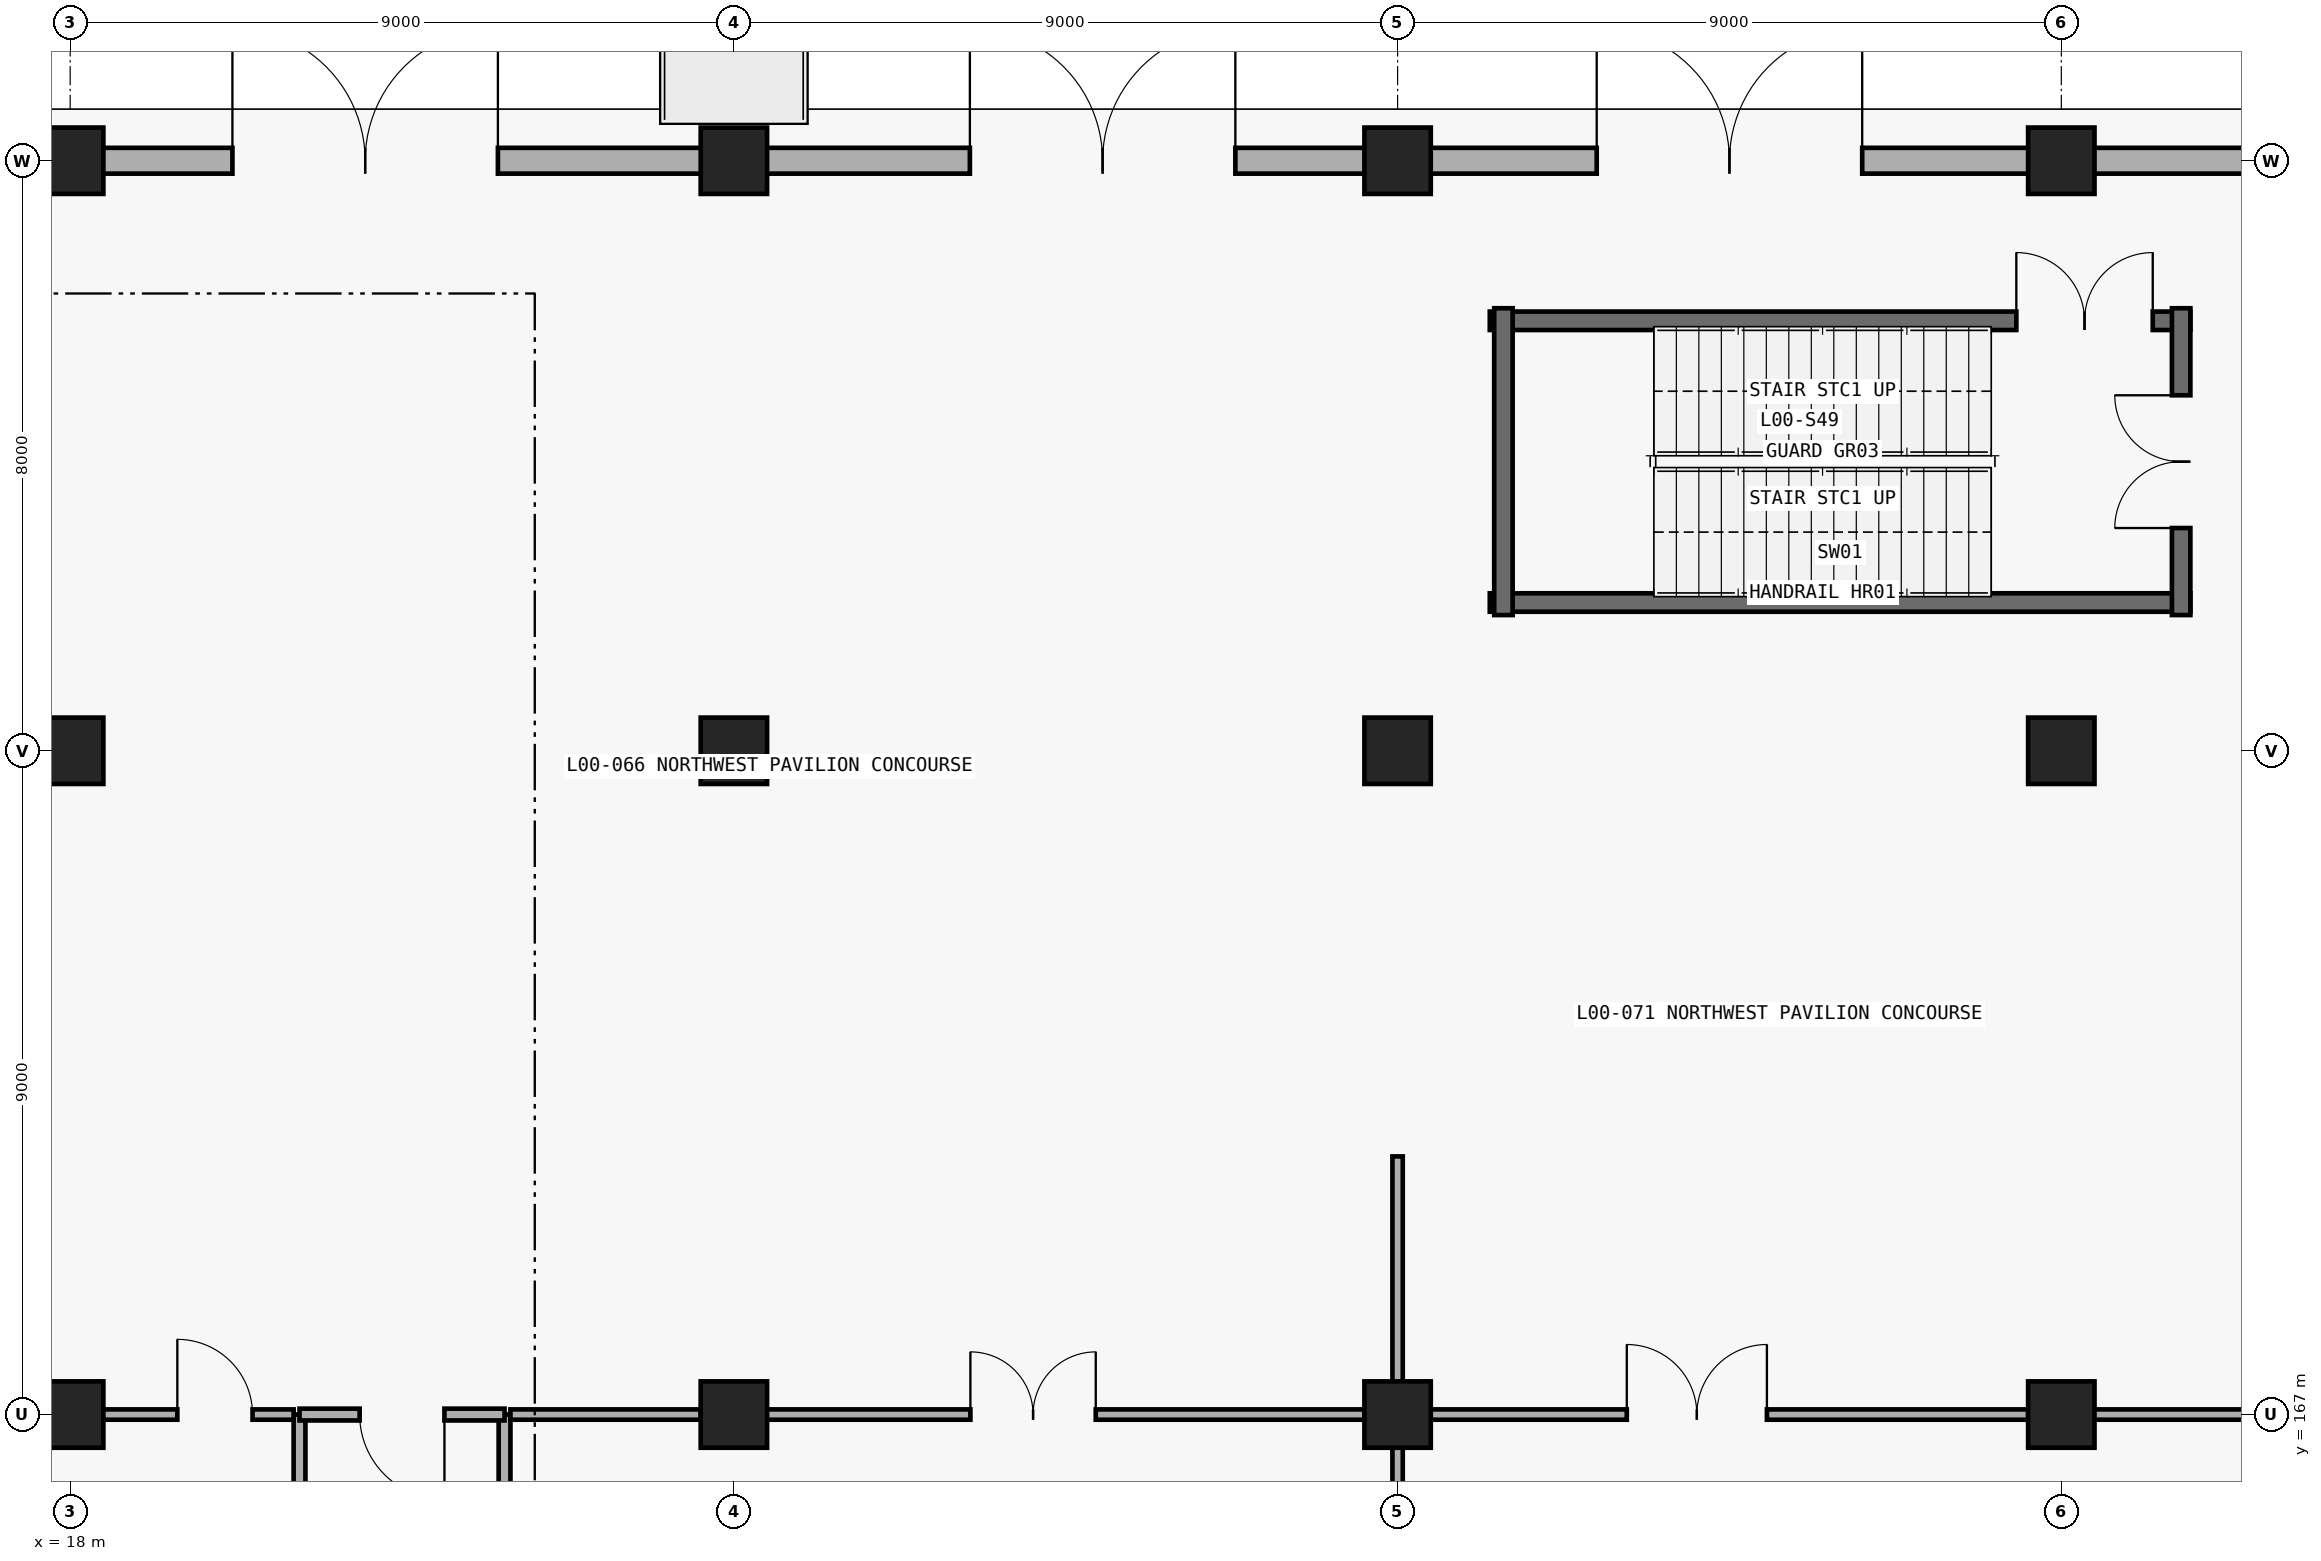
"""IFC4 building model, lengths in metres.
Left out: names, types, materials, properties, quantities, classifications, styles, units other than length and angle.
Written with IfcOpenShell. Run it as: python <this file> out.ifc"""

import sys

from ifc_helpers import new_model, si_unit, direction, frame, frame_2d, origin, origin_2d, place, context, subcontext, project, spatial, rectangle, extrude, element, fill, save


model = new_model("IFC4")
c1 = context("Model", 3, precision=1e-05, world=origin(), true_north=direction((0.0, 1.0)))
c2 = subcontext(c1, "Body", "Model", "MODEL_VIEW")
j1 = project(units=[si_unit("LENGTHUNIT", "METRE"), si_unit("PLANEANGLEUNIT", "RADIAN")], contexts=[c1])
p1 = place(None, origin())
s1 = spatial("IfcSite", under=j1, at=p1, CompositionType="ELEMENT")
p2 = place(p1, origin())
s2 = spatial("IfcBuilding", under=s1, at=p2, CompositionType="ELEMENT")
p3 = place(p2, origin())
s3 = spatial("IfcBuildingStorey", under=s2, at=p3, CompositionType="ELEMENT", Elevation=0.0)
for number, where, z_axis, x_axis in (
    (1, (18.0, 167.0, 0.0), (0.0, 0.0, 1.0), (1.0, 0.0, 0.0)),
    (2, (18.0, 176.0, 0.0), (0.0, 0.0, 1.0), (1.0, 0.0, 0.0)),
    (3, (18.0, 184.0, 0.0), (0.0, 0.0, 1.0), (1.0, 0.0, 0.0)),
    (4, (27.0, 167.0, 0.0), (0.0, 0.0, 1.0), (1.0, 0.0, 0.0)),
    (5, (27.0, 176.0, 0.0), (0.0, 0.0, 1.0), (1.0, 0.0, 0.0)),
    (6, (27.0, 184.0, 0.0), (0.0, 0.0, 1.0), (1.0, 0.0, 0.0)),
    (7, (36.0, 167.0, 0.0), (0.0, 0.0, 1.0), (1.0, 0.0, 0.0)),
    (8, (36.0, 176.0, 0.0), (0.0, 0.0, 1.0), (1.0, 0.0, 0.0)),
    (9, (36.0, 184.0, 0.0), (0.0, 0.0, 1.0), (1.0, 0.0, 0.0)),
    (10, (45.0, 167.0, 0.0), (0.0, 0.0, 1.0), (1.0, 0.0, 0.0)),
    (11, (45.0, 176.0, 0.0), (0.0, 0.0, 1.0), (1.0, 0.0, 0.0)),
    (12, (45.0, 184.0, 0.0), (0.0, 0.0, 1.0), (1.0, 0.0, 0.0)),
):
    element("IfcColumn", number, at=place(p3, frame(where, z_axis=z_axis, x_axis=x_axis)), inside=s3, PredefinedType="COLUMN", context=c2, shape_type="SweptSolid", body=[
        extrude(rectangle(XDim=0.9, YDim=0.9, at=origin_2d()), origin(), (0.0, 0.0, 1.0), 5.4),
    ])
p4 = place(p3, frame((18.425, 184.0, 0.0), z_axis=(0.0, 0.0, 1.0), x_axis=(1.0, 0.0, 0.0)))
e13 = element("IfcWall", 13, at=p4, inside=s3, PredefinedType="STANDARD", context=c2, shape_type="SweptSolid", body=[
    extrude(rectangle(XDim=8.15, YDim=0.35, at=frame_2d((4.075, 0.0))), origin(), (0.0, 0.0, 1.0), 4.384),
])
p5 = place(p4, frame((1.775, 0.0, 0.0)))
e14 = element("IfcOpeningElement", 14, at=p5, cuts=e13, PredefinedType="OPENING", context=c2, shape_type="SweptSolid", body=[
    extrude(rectangle(XDim=3.6, YDim=2.7, at=frame_2d((1.8, 1.35))), frame((0.0, 0.185, 0.0), z_axis=(0.0, -1.0, 0.0), x_axis=(1.0, 0.0, 0.0)), (0.0, 0.0, 1.0), 0.37),
])
p6 = place(p3, frame((27.425, 184.0, 0.0), z_axis=(0.0, 0.0, 1.0), x_axis=(1.0, 0.0, 0.0)))
e15 = element("IfcWall", 15, at=p6, inside=s3, PredefinedType="STANDARD", context=c2, shape_type="SweptSolid", body=[
    extrude(rectangle(XDim=8.15, YDim=0.35, at=frame_2d((4.075, 0.0))), origin(), (0.0, 0.0, 1.0), 4.384),
])
p7 = place(p6, frame((2.775, 0.0, 0.0)))
e16 = element("IfcOpeningElement", 16, at=p7, cuts=e15, PredefinedType="OPENING", context=c2, shape_type="SweptSolid", body=[
    extrude(rectangle(XDim=3.6, YDim=2.7, at=frame_2d((1.8, 1.35))), frame((0.0, 0.185, 0.0), z_axis=(0.0, -1.0, 0.0), x_axis=(1.0, 0.0, 0.0)), (0.0, 0.0, 1.0), 0.37),
])
p8 = place(p3, frame((36.425, 184.0, 0.0), z_axis=(0.0, 0.0, 1.0), x_axis=(1.0, 0.0, 0.0)))
e17 = element("IfcWall", 17, at=p8, inside=s3, PredefinedType="STANDARD", context=c2, shape_type="SweptSolid", body=[
    extrude(rectangle(XDim=8.15, YDim=0.35, at=frame_2d((4.075, 0.0))), origin(), (0.0, 0.0, 1.0), 4.384),
])
p9 = place(p8, frame((2.275, 0.0, 0.0)))
e18 = element("IfcOpeningElement", 18, at=p9, cuts=e17, PredefinedType="OPENING", context=c2, shape_type="SweptSolid", body=[
    extrude(rectangle(XDim=3.6, YDim=2.7, at=frame_2d((1.8, 1.35))), frame((0.0, 0.185, 0.0), z_axis=(0.0, -1.0, 0.0), x_axis=(1.0, 0.0, 0.0)), (0.0, 0.0, 1.0), 0.37),
])
p10 = place(p3, frame((45.425, 184.0, 0.0), z_axis=(0.0, 0.0, 1.0), x_axis=(1.0, 0.0, 0.0)))
e19 = element("IfcWall", 19, at=p10, inside=s3, PredefinedType="STANDARD", context=c2, shape_type="SweptSolid", body=[
    extrude(rectangle(XDim=8.15, YDim=0.35, at=frame_2d((4.075, 0.0))), origin(), (0.0, 0.0, 1.0), 4.384),
])
p11 = place(p10, frame((2.275, 0.0, 0.0)))
e20 = element("IfcOpeningElement", 20, at=p11, cuts=e19, PredefinedType="OPENING", context=c2, shape_type="SweptSolid", body=[
    extrude(rectangle(XDim=3.6, YDim=2.7, at=frame_2d((1.8, 1.35))), frame((0.0, 0.185, 0.0), z_axis=(0.0, -1.0, 0.0), x_axis=(1.0, 0.0, 0.0)), (0.0, 0.0, 1.0), 0.37),
])
p12 = place(p3, frame((37.25, 181.83, 0.0), z_axis=(0.0, 0.0, 1.0), x_axis=(1.0, 0.0, 0.0)))
e21 = element("IfcWall", 21, at=p12, inside=s3, PredefinedType="SHEAR", context=c2, shape_type="SweptSolid", body=[
    extrude(rectangle(XDim=9.5, YDim=0.25, at=frame_2d((4.75, 0.0))), origin(), (0.0, 0.0, 1.0), 5.1),
])
p13 = place(p12, frame((7.14, 0.0, 0.0)))
e22 = element("IfcOpeningElement", 22, at=p13, cuts=e21, PredefinedType="OPENING", context=c2, shape_type="SweptSolid", body=[
    extrude(rectangle(XDim=1.85, YDim=2.3, at=frame_2d((0.925, 1.15))), frame((0.0, 0.135, 0.0), z_axis=(0.0, -1.0, 0.0), x_axis=(1.0, 0.0, 0.0)), (0.0, 0.0, 1.0), 0.27),
])
p14 = place(p3, frame((37.25, 178.01, 0.0), z_axis=(0.0, 0.0, 1.0), x_axis=(1.0, 0.0, 0.0)))
e23 = element("IfcWall", 23, at=p14, inside=s3, PredefinedType="SHEAR", context=c2, shape_type="SweptSolid", body=[
    extrude(rectangle(XDim=9.5, YDim=0.25, at=frame_2d((4.75, 0.0))), origin(), (0.0, 0.0, 1.0), 5.1),
])
p15 = place(p3, frame((46.625, 177.84, 0.0), z_axis=(0.0, 0.0, 1.0), x_axis=(0.0, 1.0, 0.0)))
e24 = element("IfcWall", 24, at=p15, inside=s3, PredefinedType="SHEAR", context=c2, shape_type="SweptSolid", body=[
    extrude(rectangle(XDim=4.16, YDim=0.25, at=frame_2d((2.08, 0.0))), origin(), (0.0, 0.0, 1.0), 5.1),
])
p16 = place(p15, frame((1.18, 0.0, 0.0)))
e25 = element("IfcOpeningElement", 25, at=p16, cuts=e24, PredefinedType="OPENING", context=c2, shape_type="SweptSolid", body=[
    extrude(rectangle(XDim=1.8, YDim=2.25, at=frame_2d((0.9, 1.125))), frame((0.0, 0.135, 0.0), z_axis=(0.0, -1.0, 0.0), x_axis=(1.0, 0.0, 0.0)), (0.0, 0.0, 1.0), 0.27),
])
p17 = place(p3, frame((37.435, 182.0, 0.0), z_axis=(0.0, 0.0, 1.0), x_axis=(0.0, -1.0, 0.0)))
e26 = element("IfcWall", 26, at=p17, inside=s3, PredefinedType="SHEAR", context=c2, shape_type="SweptSolid", body=[
    extrude(rectangle(XDim=4.16, YDim=0.25, at=frame_2d((2.08, 0.0))), origin(), (0.0, 0.0, 1.0), 5.1),
])
for number, where, z_axis, x_axis in (
    (27, (23.89, 164.25, 0.0), (0.0, 0.0, 1.0), (0.0, 1.0, 0.0)),
    (28, (21.11, 164.25, 0.0), (0.0, 0.0, 1.0), (0.0, 1.0, 0.0)),
):
    element("IfcWall", number, at=place(p3, frame(where, z_axis=z_axis, x_axis=x_axis)), inside=s3, PredefinedType="PARTITIONING", context=c2, shape_type="SweptSolid", body=[
        extrude(rectangle(XDim=2.75, YDim=0.16, at=frame_2d((1.375, 0.0))), origin(), (0.0, 0.0, 1.0), 4.384),
    ])
p18 = place(p3, frame((23.89, 167.0, 0.0), z_axis=(0.0, 0.0, 1.0), x_axis=(-1.0, 0.0, 0.0)))
e29 = element("IfcWall", 29, at=p18, inside=s3, PredefinedType="PARTITIONING", context=c2, shape_type="SweptSolid", body=[
    extrude(rectangle(XDim=2.78, YDim=0.16, at=frame_2d((1.39, 0.0))), origin(), (0.0, 0.0, 1.0), 4.384),
])
p19 = place(p18, frame((0.815, 0.0, 0.0)))
e30 = element("IfcOpeningElement", 30, at=p19, cuts=e29, PredefinedType="OPENING", context=c2, shape_type="SweptSolid", body=[
    extrude(rectangle(XDim=1.15, YDim=2.2, at=frame_2d((0.575, 1.1))), frame((0.0, 0.09, 0.0), z_axis=(0.0, -1.0, 0.0), x_axis=(1.0, 0.0, 0.0)), (0.0, 0.0, 1.0), 0.18),
])
p20 = place(p3, frame((17.55, 167.0, 0.0), z_axis=(0.0, 0.0, 1.0), x_axis=(1.0, 0.0, 0.0)))
e31 = element("IfcWall", 31, at=p20, inside=s3, PredefinedType="PARTITIONING", context=c2, shape_type="SweptSolid", body=[
    extrude(rectangle(XDim=3.48, YDim=0.14, at=frame_2d((1.74, 0.0))), origin(), (0.0, 0.0, 1.0), 4.384),
])
p21 = place(p20, frame((1.903, 0.0, 0.0)))
e32 = element("IfcOpeningElement", 32, at=p21, cuts=e31, PredefinedType="OPENING", context=c2, shape_type="SweptSolid", body=[
    extrude(rectangle(XDim=1.02, YDim=2.2, at=frame_2d((0.51, 1.1))), frame((0.0, 0.08, 0.0), z_axis=(0.0, -1.0, 0.0), x_axis=(1.0, 0.0, 0.0)), (0.0, 0.0, 1.0), 0.16),
])
p22 = place(p3, frame((23.97, 167.0, 0.0), z_axis=(0.0, 0.0, 1.0), x_axis=(1.0, 0.0, 0.0)))
e33 = element("IfcWall", 33, at=p22, inside=s3, PredefinedType="PARTITIONING", context=c2, shape_type="SweptSolid", body=[
    extrude(rectangle(XDim=2.595, YDim=0.14, at=frame_2d((1.297, 0.0))), origin(), (0.0, 0.0, 1.0), 4.384),
])
p23 = place(p3, frame((26.55, 167.0, 0.0), z_axis=(0.0, 0.0, 1.0), x_axis=(1.0, 0.0, 0.0)))
e34 = element("IfcWall", 34, at=p23, inside=s3, PredefinedType="PARTITIONING", context=c2, shape_type="SweptSolid", body=[
    extrude(rectangle(XDim=9.015, YDim=0.14, at=frame_2d((4.507, 0.0))), origin(), (0.0, 0.0, 1.0), 4.384),
])
p24 = place(p23, frame((3.657, 0.0, 0.0)))
e35 = element("IfcOpeningElement", 35, at=p24, cuts=e34, PredefinedType="OPENING", context=c2, shape_type="SweptSolid", body=[
    extrude(rectangle(XDim=1.7, YDim=2.2, at=frame_2d((0.85, 1.1))), frame((0.0, 0.08, 0.0), z_axis=(0.0, -1.0, 0.0), x_axis=(1.0, 0.0, 0.0)), (0.0, 0.0, 1.0), 0.16),
])
p25 = place(p3, frame((35.55, 167.0, 0.0), z_axis=(0.0, 0.0, 1.0), x_axis=(1.0, 0.0, 0.0)))
e36 = element("IfcWall", 36, at=p25, inside=s3, PredefinedType="PARTITIONING", context=c2, shape_type="SweptSolid", body=[
    extrude(rectangle(XDim=9.015, YDim=0.14, at=frame_2d((4.507, 0.0))), origin(), (0.0, 0.0, 1.0), 4.384),
])
p26 = place(p25, frame((3.558, 0.0, 0.0)))
e37 = element("IfcOpeningElement", 37, at=p26, cuts=e36, PredefinedType="OPENING", context=c2, shape_type="SweptSolid", body=[
    extrude(rectangle(XDim=1.9, YDim=2.25, at=frame_2d((0.95, 1.125))), frame((0.0, 0.08, 0.0), z_axis=(0.0, -1.0, 0.0), x_axis=(1.0, 0.0, 0.0)), (0.0, 0.0, 1.0), 0.16),
])
p27 = place(p3, frame((44.55, 167.0, 0.0), z_axis=(0.0, 0.0, 1.0), x_axis=(1.0, 0.0, 0.0)))
e38 = element("IfcWall", 38, at=p27, inside=s3, PredefinedType="PARTITIONING", context=c2, shape_type="SweptSolid", body=[
    extrude(rectangle(XDim=9.015, YDim=0.14, at=frame_2d((4.507, 0.0))), origin(), (0.0, 0.0, 1.0), 4.384),
])
p28 = place(p27, frame((3.508, 0.0, 0.0)))
e39 = element("IfcOpeningElement", 39, at=p28, cuts=e38, PredefinedType="OPENING", context=c2, shape_type="SweptSolid", body=[
    extrude(rectangle(XDim=2.0, YDim=2.3, at=frame_2d((1.0, 1.15))), frame((0.0, 0.08, 0.0), z_axis=(0.0, -1.0, 0.0), x_axis=(1.0, 0.0, 0.0)), (0.0, 0.0, 1.0), 0.16),
])
p29 = place(p3, frame((36.0, 158.435, 0.0), z_axis=(0.0, 0.0, 1.0), x_axis=(0.0, 1.0, 0.0)))
e40 = element("IfcWall", 40, at=p29, inside=s3, PredefinedType="PARTITIONING", context=c2, shape_type="SweptSolid", body=[
    extrude(rectangle(XDim=8.51, YDim=0.14, at=frame_2d((4.255, 0.0))), origin(), (0.0, 0.0, 1.0), 4.417),
])
p30 = place(p3, frame((36.0, 167.055, 0.0), z_axis=(0.0, 0.0, 1.0), x_axis=(0.0, 1.0, 0.0)))
e41 = element("IfcWall", 41, at=p30, inside=s3, PredefinedType="PARTITIONING", context=c2, shape_type="SweptSolid", body=[
    extrude(rectangle(XDim=3.445, YDim=0.14, at=frame_2d((1.723, 0.0))), origin(), (0.0, 0.0, 1.0), 4.417),
])
p31 = place(p5, origin())
e42 = element("IfcDoor", 42, at=p31, inside=s3, OperationType="DOUBLE_DOOR_SINGLE_SWING", PredefinedType="DOOR", context=c2, shape_type="SweptSolid", body=[
    extrude(rectangle(XDim=3.6, YDim=2.7, at=frame_2d((1.8, 1.35))), frame((0.0, 0.025, 0.0), z_axis=(0.0, -1.0, 0.0), x_axis=(1.0, 0.0, 0.0)), (0.0, 0.0, 1.0), 0.05),
])
fill(e14, e42)
p32 = place(p7, origin())
e43 = element("IfcDoor", 43, at=p32, inside=s3, OperationType="DOUBLE_DOOR_SINGLE_SWING", PredefinedType="DOOR", context=c2, shape_type="SweptSolid", body=[
    extrude(rectangle(XDim=3.6, YDim=2.7, at=frame_2d((1.8, 1.35))), frame((0.0, 0.025, 0.0), z_axis=(0.0, -1.0, 0.0), x_axis=(1.0, 0.0, 0.0)), (0.0, 0.0, 1.0), 0.05),
])
fill(e16, e43)
p33 = place(p9, origin())
e44 = element("IfcDoor", 44, at=p33, inside=s3, OperationType="DOUBLE_DOOR_SINGLE_SWING", PredefinedType="DOOR", context=c2, shape_type="SweptSolid", body=[
    extrude(rectangle(XDim=3.6, YDim=2.7, at=frame_2d((1.8, 1.35))), frame((0.0, 0.025, 0.0), z_axis=(0.0, -1.0, 0.0), x_axis=(1.0, 0.0, 0.0)), (0.0, 0.0, 1.0), 0.05),
])
fill(e18, e44)
p34 = place(p16, origin())
e45 = element("IfcDoor", 45, at=p34, inside=s3, OperationType="DOUBLE_DOOR_SINGLE_SWING", PredefinedType="DOOR", context=c2, shape_type="SweptSolid", body=[
    extrude(rectangle(XDim=1.8, YDim=2.25, at=frame_2d((0.9, 1.125))), frame((0.0, 0.025, 0.0), z_axis=(0.0, -1.0, 0.0), x_axis=(1.0, 0.0, 0.0)), (0.0, 0.0, 1.0), 0.05),
])
fill(e25, e45)
p35 = place(p13, origin())
e46 = element("IfcDoor", 46, at=p35, inside=s3, OperationType="DOUBLE_DOOR_SINGLE_SWING", PredefinedType="DOOR", context=c2, shape_type="SweptSolid", body=[
    extrude(rectangle(XDim=1.85, YDim=2.3, at=frame_2d((0.925, 1.15))), frame((0.0, 0.025, 0.0), z_axis=(0.0, -1.0, 0.0), x_axis=(1.0, 0.0, 0.0)), (0.0, 0.0, 1.0), 0.05),
])
fill(e22, e46)
p36 = place(p19, origin())
e47 = element("IfcDoor", 47, at=p36, inside=s3, OperationType="SINGLE_SWING_LEFT", PredefinedType="DOOR", context=c2, shape_type="SweptSolid", body=[
    extrude(rectangle(XDim=1.15, YDim=2.2, at=frame_2d((0.575, 1.1))), frame((0.0, 0.025, 0.0), z_axis=(0.0, -1.0, 0.0), x_axis=(1.0, 0.0, 0.0)), (0.0, 0.0, 1.0), 0.05),
])
fill(e30, e47)
p37 = place(p21, origin())
e48 = element("IfcDoor", 48, at=p37, inside=s3, OperationType="SINGLE_SWING_LEFT", PredefinedType="DOOR", context=c2, shape_type="SweptSolid", body=[
    extrude(rectangle(XDim=1.02, YDim=2.2, at=frame_2d((0.51, 1.1))), frame((0.0, 0.025, 0.0), z_axis=(0.0, -1.0, 0.0), x_axis=(1.0, 0.0, 0.0)), (0.0, 0.0, 1.0), 0.05),
])
fill(e32, e48)
p38 = place(p24, origin())
e49 = element("IfcDoor", 49, at=p38, inside=s3, OperationType="DOUBLE_DOOR_SINGLE_SWING", PredefinedType="DOOR", context=c2, shape_type="SweptSolid", body=[
    extrude(rectangle(XDim=1.7, YDim=2.2, at=frame_2d((0.85, 1.1))), frame((0.0, 0.025, 0.0), z_axis=(0.0, -1.0, 0.0), x_axis=(1.0, 0.0, 0.0)), (0.0, 0.0, 1.0), 0.05),
])
fill(e35, e49)
p39 = place(p26, origin())
e50 = element("IfcDoor", 50, at=p39, inside=s3, OperationType="DOUBLE_DOOR_SINGLE_SWING", PredefinedType="DOOR", context=c2, shape_type="SweptSolid", body=[
    extrude(rectangle(XDim=1.9, YDim=2.25, at=frame_2d((0.95, 1.125))), frame((0.0, 0.025, 0.0), z_axis=(0.0, -1.0, 0.0), x_axis=(1.0, 0.0, 0.0)), (0.0, 0.0, 1.0), 0.05),
])
fill(e37, e50)
save(model, sys.argv[1])
